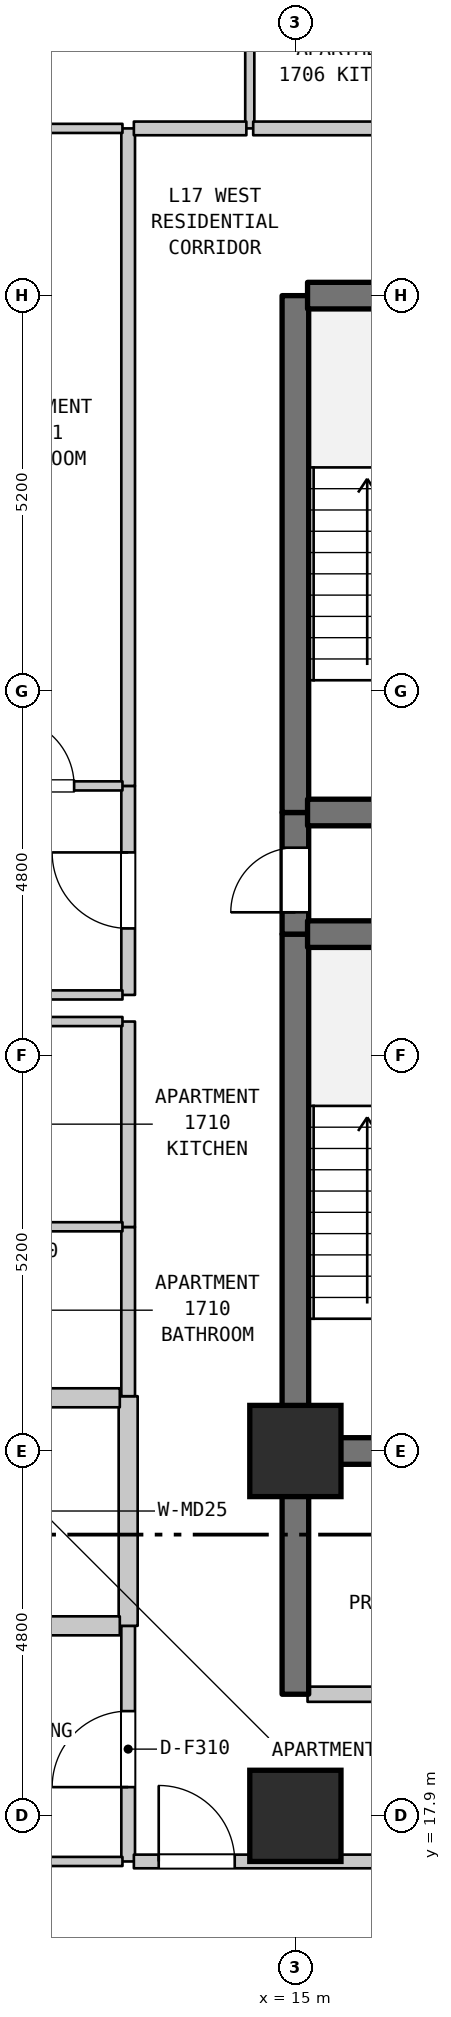
"""IFC4 building model, lengths in metres.
Left out: names, types, materials, properties, quantities, classifications, styles, units other than length and angle.
Written with IfcOpenShell. Run it as: python <this file> out.ifc"""

import sys

from ifc_helpers import new_model, si_unit, direction, frame, frame_2d, origin, origin_2d, place, context, subcontext, project, spatial, rectangle, extrude, element, fill, save


model = new_model("IFC4")
c1 = context("Model", 3, precision=1e-05, world=origin(), true_north=direction((0.0, 1.0)))
c2 = subcontext(c1, "Body", "Model", "MODEL_VIEW")
j1 = project(units=[si_unit("LENGTHUNIT", "METRE"), si_unit("PLANEANGLEUNIT", "RADIAN")], contexts=[c1])
p1 = place(None, origin())
s1 = spatial("IfcSite", under=j1, at=p1, CompositionType="ELEMENT")
p2 = place(p1, origin())
s2 = spatial("IfcBuilding", under=s1, at=p2, CompositionType="ELEMENT")
p3 = place(p2, frame((0.0, 0.0, 73.8)))
s3 = spatial("IfcBuildingStorey", under=s2, at=p3, CompositionType="ELEMENT", Elevation=73.8)
for number, where, z_axis, x_axis in (
    (1, (15.0, 17.9, 0.0), (0.0, 0.0, 1.0), (1.0, 0.0, 0.0)),
    (2, (15.0, 22.7, 0.0), (0.0, 0.0, 1.0), (1.0, 0.0, 0.0)),
):
    element("IfcColumn", number, at=place(p3, frame(where, z_axis=z_axis, x_axis=x_axis)), inside=s3, PredefinedType="COLUMN", context=c2, shape_type="SweptSolid", body=[
        extrude(rectangle(XDim=1.2, YDim=1.2, at=origin_2d()), origin(), (0.0, 0.0, 1.0), 3.7),
    ])
p4 = place(p3, frame((12.8, 17.3, 0.0), z_axis=(0.0, 0.0, 1.0), x_axis=(0.0, 1.0, 0.0)))
e3 = element("IfcWall", 3, at=p4, inside=s3, PredefinedType="STANDARD", context=c2, shape_type="SweptSolid", body=[
    extrude(rectangle(XDim=3.1, YDim=0.18, at=frame_2d((1.55, 0.0))), origin(), (0.0, 0.0, 1.0), 3.385),
])
p5 = place(p4, frame((0.978, 0.0, 0.0)))
e4 = element("IfcOpeningElement", 4, at=p5, cuts=e3, PredefinedType="OPENING", context=c2, shape_type="SweptSolid", body=[
    extrude(rectangle(XDim=1.0, YDim=2.15, at=frame_2d((0.5, 1.075))), frame((0.0, 0.1, 0.0), z_axis=(0.0, -1.0, 0.0), x_axis=(1.0, 0.0, 0.0)), (0.0, 0.0, 1.0), 0.2),
])
p6 = place(p3, frame((12.8, 20.4, 0.0), z_axis=(0.0, 0.0, 1.0), x_axis=(0.0, 1.0, 0.0)))
e5 = element("IfcWall", 5, at=p6, inside=s3, PredefinedType="STANDARD", context=c2, shape_type="SweptSolid", body=[
    extrude(rectangle(XDim=3.021, YDim=0.25, at=frame_2d((1.51, 0.0))), origin(), (0.0, 0.0, 1.0), 3.385),
])
p7 = place(p3, frame((12.8, 23.421, 0.0), z_axis=(0.0, 0.0, 1.0), x_axis=(0.0, 1.0, 0.0)))
e6 = element("IfcWall", 6, at=p7, inside=s3, PredefinedType="STANDARD", context=c2, shape_type="SweptSolid", body=[
    extrude(rectangle(XDim=2.226, YDim=0.18, at=frame_2d((1.113, 0.0))), origin(), (0.0, 0.0, 1.0), 3.385),
])
p8 = place(p3, frame((12.8, 25.647, 0.0), z_axis=(0.0, 0.0, 1.0), x_axis=(0.0, 1.0, 0.0)))
e7 = element("IfcWall", 7, at=p8, inside=s3, PredefinedType="STANDARD", context=c2, shape_type="SweptSolid", body=[
    extrude(rectangle(XDim=2.703, YDim=0.18, at=frame_2d((1.352, 0.0))), origin(), (0.0, 0.0, 1.0), 3.385),
])
p9 = place(p3, frame((12.8, 28.7, 0.0), z_axis=(0.0, 0.0, 1.0), x_axis=(0.0, 1.0, 0.0)))
e8 = element("IfcWall", 8, at=p9, inside=s3, PredefinedType="STANDARD", context=c2, shape_type="SweptSolid", body=[
    extrude(rectangle(XDim=2.75, YDim=0.18, at=frame_2d((1.375, 0.0))), origin(), (0.0, 0.0, 1.0), 3.385),
])
p10 = place(p9, frame((0.875, 0.0, 0.0)))
e9 = element("IfcOpeningElement", 9, at=p10, cuts=e8, PredefinedType="OPENING", context=c2, shape_type="SweptSolid", body=[
    extrude(rectangle(XDim=1.0, YDim=2.15, at=frame_2d((0.5, 1.075))), frame((0.0, 0.1, 0.0), z_axis=(0.0, -1.0, 0.0), x_axis=(1.0, 0.0, 0.0)), (0.0, 0.0, 1.0), 0.2),
])
p11 = place(p3, frame((12.8, 31.45, 0.0), z_axis=(0.0, 0.0, 1.0), x_axis=(0.0, 1.0, 0.0)))
e10 = element("IfcWall", 10, at=p11, inside=s3, PredefinedType="STANDARD", context=c2, shape_type="SweptSolid", body=[
    extrude(rectangle(XDim=8.65, YDim=0.18, at=frame_2d((4.325, 0.0))), origin(), (0.0, 0.0, 1.0), 3.385),
])
p12 = place(p3, frame((14.4, 40.1, 0.0), z_axis=(0.0, 0.0, 1.0), x_axis=(0.0, 1.0, 0.0)))
e11 = element("IfcWall", 11, at=p12, inside=s3, PredefinedType="PARTITIONING", context=c2, shape_type="SweptSolid", body=[
    extrude(rectangle(XDim=2.3, YDim=0.12, at=frame_2d((1.15, 0.0))), origin(), (0.0, 0.0, 1.0), 3.385),
])
p13 = place(p3, frame((15.0, 19.5, 0.0), z_axis=(0.0, 0.0, 1.0), x_axis=(0.0, 1.0, 0.0)))
e12 = element("IfcWall", 12, at=p13, inside=s3, PredefinedType="SHEAR", context=c2, shape_type="SweptSolid", body=[
    extrude(rectangle(XDim=3.2, YDim=0.35, at=frame_2d((1.6, 0.0))), origin(), (0.0, 0.0, 1.0), 3.385),
])
p14 = place(p3, frame((15.0, 22.7, 0.0), z_axis=(0.0, 0.0, 1.0), x_axis=(0.0, 1.0, 0.0)))
e13 = element("IfcWall", 13, at=p14, inside=s3, PredefinedType="SHEAR", context=c2, shape_type="SweptSolid", body=[
    extrude(rectangle(XDim=6.8, YDim=0.35, at=frame_2d((3.4, 0.0))), origin(), (0.0, 0.0, 1.0), 3.385),
])
p15 = place(p3, frame((15.0, 29.5, 0.0), z_axis=(0.0, 0.0, 1.0), x_axis=(0.0, 1.0, 0.0)))
e14 = element("IfcWall", 14, at=p15, inside=s3, PredefinedType="SHEAR", context=c2, shape_type="SweptSolid", body=[
    extrude(rectangle(XDim=1.6, YDim=0.35, at=frame_2d((0.8, 0.0))), origin(), (0.0, 0.0, 1.0), 3.385),
])
p16 = place(p15, frame((0.287, 0.0, 0.0)))
e15 = element("IfcOpeningElement", 15, at=p16, cuts=e14, PredefinedType="OPENING", context=c2, shape_type="SweptSolid", body=[
    extrude(rectangle(XDim=0.85, YDim=2.1, at=frame_2d((0.425, 1.05))), frame((0.0, 0.185, 0.0), z_axis=(0.0, -1.0, 0.0), x_axis=(1.0, 0.0, 0.0)), (0.0, 0.0, 1.0), 0.37),
])
p17 = place(p3, frame((15.0, 31.1, 0.0), z_axis=(0.0, 0.0, 1.0), x_axis=(0.0, 1.0, 0.0)))
e16 = element("IfcWall", 16, at=p17, inside=s3, PredefinedType="SHEAR", context=c2, shape_type="SweptSolid", body=[
    extrude(rectangle(XDim=6.8, YDim=0.35, at=frame_2d((3.4, 0.0))), origin(), (0.0, 0.0, 1.0), 3.385),
])
p18 = place(p3, frame((9.085, 17.3, 0.0), z_axis=(0.0, 0.0, 1.0), x_axis=(1.0, 0.0, 0.0)))
e17 = element("IfcWall", 17, at=p18, inside=s3, PredefinedType="PARTITIONING", context=c2, shape_type="SweptSolid", body=[
    extrude(rectangle(XDim=3.64, YDim=0.12, at=frame_2d((1.82, 0.0))), origin(), (0.0, 0.0, 1.0), 3.385),
])
p19 = place(p3, frame((12.875, 17.3, 0.0), z_axis=(0.0, 0.0, 1.0), x_axis=(1.0, 0.0, 0.0)))
e18 = element("IfcWall", 18, at=p19, inside=s3, PredefinedType="STANDARD", context=c2, shape_type="SweptSolid", body=[
    extrude(rectangle(XDim=3.58, YDim=0.18, at=frame_2d((1.79, 0.0))), origin(), (0.0, 0.0, 1.0), 3.385),
])
p20 = place(p19, frame((0.327, 0.0, 0.0)))
e19 = element("IfcOpeningElement", 19, at=p20, cuts=e18, PredefinedType="OPENING", context=c2, shape_type="SweptSolid", body=[
    extrude(rectangle(XDim=1.0, YDim=2.15, at=frame_2d((0.5, 1.075))), frame((0.0, 0.1, 0.0), z_axis=(0.0, -1.0, 0.0), x_axis=(1.0, 0.0, 0.0)), (0.0, 0.0, 1.0), 0.2),
])
p21 = place(p3, frame((15.16, 19.5, 0.0), z_axis=(0.0, 0.0, 1.0), x_axis=(1.0, 0.0, 0.0)))
e20 = element("IfcWall", 20, at=p21, inside=s3, PredefinedType="STANDARD", context=c2, shape_type="SweptSolid", body=[
    extrude(rectangle(XDim=3.68, YDim=0.2, at=frame_2d((1.84, 0.0))), origin(), (0.0, 0.0, 1.0), 3.385),
])
p22 = place(p21, frame((1.39, 0.0, 0.0)))
e21 = element("IfcOpeningElement", 21, at=p22, cuts=e20, PredefinedType="OPENING", context=c2, shape_type="SweptSolid", body=[
    extrude(rectangle(XDim=0.9, YDim=2.15, at=frame_2d((0.45, 1.075))), frame((0.0, 0.11, 0.0), z_axis=(0.0, -1.0, 0.0), x_axis=(1.0, 0.0, 0.0)), (0.0, 0.0, 1.0), 0.22),
])
p23 = place(p3, frame((10.66, 20.4, 0.0), z_axis=(0.0, 0.0, 1.0), x_axis=(1.0, 0.0, 0.0)))
e22 = element("IfcWall", 22, at=p23, inside=s3, PredefinedType="STANDARD", context=c2, shape_type="SweptSolid", body=[
    extrude(rectangle(XDim=2.03, YDim=0.25, at=frame_2d((1.015, 0.0))), origin(), (0.0, 0.0, 1.0), 3.385),
])
p24 = place(p3, frame((15.16, 22.7, 0.0), z_axis=(0.0, 0.0, 1.0), x_axis=(1.0, 0.0, 0.0)))
e23 = element("IfcWall", 23, at=p24, inside=s3, PredefinedType="SHEAR", context=c2, shape_type="SweptSolid", body=[
    extrude(rectangle(XDim=3.68, YDim=0.35, at=frame_2d((1.84, 0.0))), origin(), (0.0, 0.0, 1.0), 3.385),
])
p25 = place(p3, frame((10.66, 23.4, 0.0), z_axis=(0.0, 0.0, 1.0), x_axis=(1.0, 0.0, 0.0)))
e24 = element("IfcWall", 24, at=p25, inside=s3, PredefinedType="STANDARD", context=c2, shape_type="SweptSolid", body=[
    extrude(rectangle(XDim=2.03, YDim=0.25, at=frame_2d((1.015, 0.0))), origin(), (0.0, 0.0, 1.0), 3.385),
])
for number, where, z_axis, x_axis in (
    (25, (10.595, 25.65, 0.0), (0.0, 0.0, 1.0), (1.0, 0.0, 0.0)),
    (26, (10.595, 28.35, 0.0), (0.0, 0.0, 1.0), (1.0, 0.0, 0.0)),
):
    element("IfcWall", number, at=place(p3, frame(where, z_axis=z_axis, x_axis=x_axis)), inside=s3, PredefinedType="PARTITIONING", context=c2, shape_type="SweptSolid", body=[
        extrude(rectangle(XDim=2.13, YDim=0.12, at=frame_2d((1.065, 0.0))), origin(), (0.0, 0.0, 1.0), 3.385),
    ])
p26 = place(p3, frame((9.03, 28.7, 0.0), z_axis=(0.0, 0.0, 1.0), x_axis=(1.0, 0.0, 0.0)))
e27 = element("IfcWall", 27, at=p26, inside=s3, PredefinedType="PARTITIONING", context=c2, shape_type="SweptSolid", body=[
    extrude(rectangle(XDim=3.695, YDim=0.12, at=frame_2d((1.848, 0.0))), origin(), (0.0, 0.0, 1.0), 3.385),
])
for number, where, z_axis, x_axis in (
    (28, (15.16, 29.5, 0.0), (0.0, 0.0, 1.0), (1.0, 0.0, 0.0)),
    (29, (15.16, 31.1, 0.0), (0.0, 0.0, 1.0), (1.0, 0.0, 0.0)),
):
    element("IfcWall", number, at=place(p3, frame(where, z_axis=z_axis, x_axis=x_axis)), inside=s3, PredefinedType="SHEAR", context=c2, shape_type="SweptSolid", body=[
        extrude(rectangle(XDim=3.68, YDim=0.35, at=frame_2d((1.84, 0.0))), origin(), (0.0, 0.0, 1.0), 3.385),
    ])
p27 = place(p3, frame((10.523, 31.45, 0.0), z_axis=(0.0, 0.0, 1.0), x_axis=(1.0, 0.0, 0.0)))
e30 = element("IfcWall", 30, at=p27, inside=s3, PredefinedType="PARTITIONING", context=c2, shape_type="SweptSolid", body=[
    extrude(rectangle(XDim=2.202, YDim=0.12, at=frame_2d((1.101, 0.0))), origin(), (0.0, 0.0, 1.0), 3.385),
])
p28 = place(p27, frame((0.666, 0.0, 0.0)))
e31 = element("IfcOpeningElement", 31, at=p28, cuts=e30, PredefinedType="OPENING", context=c2, shape_type="SweptSolid", body=[
    extrude(rectangle(XDim=0.9, YDim=2.1, at=frame_2d((0.45, 1.05))), frame((0.0, 0.07, 0.0), z_axis=(0.0, -1.0, 0.0), x_axis=(1.0, 0.0, 0.0)), (0.0, 0.0, 1.0), 0.14),
])
p29 = place(p3, frame((15.16, 37.9, 0.0), z_axis=(0.0, 0.0, 1.0), x_axis=(1.0, 0.0, 0.0)))
e32 = element("IfcWall", 32, at=p29, inside=s3, PredefinedType="SHEAR", context=c2, shape_type="SweptSolid", body=[
    extrude(rectangle(XDim=3.68, YDim=0.35, at=frame_2d((1.84, 0.0))), origin(), (0.0, 0.0, 1.0), 3.385),
])
p30 = place(p3, frame((10.523, 40.1, 0.0), z_axis=(0.0, 0.0, 1.0), x_axis=(1.0, 0.0, 0.0)))
e33 = element("IfcWall", 33, at=p30, inside=s3, PredefinedType="PARTITIONING", context=c2, shape_type="SweptSolid", body=[
    extrude(rectangle(XDim=2.202, YDim=0.12, at=frame_2d((1.101, 0.0))), origin(), (0.0, 0.0, 1.0), 3.385),
])
p31 = place(p3, frame((12.875, 40.1, 0.0), z_axis=(0.0, 0.0, 1.0), x_axis=(1.0, 0.0, 0.0)))
e34 = element("IfcWall", 34, at=p31, inside=s3, PredefinedType="STANDARD", context=c2, shape_type="SweptSolid", body=[
    extrude(rectangle(XDim=1.48, YDim=0.18, at=frame_2d((0.74, 0.0))), origin(), (0.0, 0.0, 1.0), 3.385),
])
p32 = place(p3, frame((14.445, 40.1, 0.0), z_axis=(0.0, 0.0, 1.0), x_axis=(1.0, 0.0, 0.0)))
e35 = element("IfcWall", 35, at=p32, inside=s3, PredefinedType="STANDARD", context=c2, shape_type="SweptSolid", body=[
    extrude(rectangle(XDim=2.486, YDim=0.18, at=frame_2d((1.243, 0.0))), origin(), (0.0, 0.0, 1.0), 3.385),
])
p33 = place(p5, origin())
e36 = element("IfcDoor", 36, at=p33, inside=s3, OperationType="SINGLE_SWING_LEFT", PredefinedType="DOOR", context=c2, shape_type="SweptSolid", body=[
    extrude(rectangle(XDim=1.0, YDim=2.15, at=frame_2d((0.5, 1.075))), frame((0.0, 0.025, 0.0), z_axis=(0.0, -1.0, 0.0), x_axis=(1.0, 0.0, 0.0)), (0.0, 0.0, 1.0), 0.05),
])
fill(e4, e36)
p34 = place(p10, origin())
e37 = element("IfcDoor", 37, at=p34, inside=s3, OperationType="SINGLE_SWING_RIGHT", PredefinedType="DOOR", context=c2, shape_type="SweptSolid", body=[
    extrude(rectangle(XDim=1.0, YDim=2.15, at=frame_2d((0.5, 1.075))), frame((0.0, 0.025, 0.0), z_axis=(0.0, -1.0, 0.0), x_axis=(1.0, 0.0, 0.0)), (0.0, 0.0, 1.0), 0.05),
])
fill(e9, e37)
p35 = place(p16, origin())
e38 = element("IfcDoor", 38, at=p35, inside=s3, OperationType="SINGLE_SWING_LEFT", PredefinedType="DOOR", context=c2, shape_type="SweptSolid", body=[
    extrude(rectangle(XDim=0.85, YDim=2.1, at=frame_2d((0.425, 1.05))), frame((0.0, 0.025, 0.0), z_axis=(0.0, -1.0, 0.0), x_axis=(1.0, 0.0, 0.0)), (0.0, 0.0, 1.0), 0.05),
])
fill(e15, e38)
p36 = place(p20, origin())
e39 = element("IfcDoor", 39, at=p36, inside=s3, OperationType="SINGLE_SWING_LEFT", PredefinedType="DOOR", context=c2, shape_type="SweptSolid", body=[
    extrude(rectangle(XDim=1.0, YDim=2.15, at=frame_2d((0.5, 1.075))), frame((0.0, 0.025, 0.0), z_axis=(0.0, -1.0, 0.0), x_axis=(1.0, 0.0, 0.0)), (0.0, 0.0, 1.0), 0.05),
])
fill(e19, e39)
p37 = place(p28, origin())
e40 = element("IfcDoor", 40, at=p37, inside=s3, OperationType="SINGLE_SWING_LEFT", PredefinedType="DOOR", context=c2, shape_type="SweptSolid", body=[
    extrude(rectangle(XDim=0.9, YDim=2.1, at=frame_2d((0.45, 1.05))), frame((0.0, 0.025, 0.0), z_axis=(0.0, -1.0, 0.0), x_axis=(1.0, 0.0, 0.0)), (0.0, 0.0, 1.0), 0.05),
])
fill(e31, e40)
save(model, sys.argv[1])
